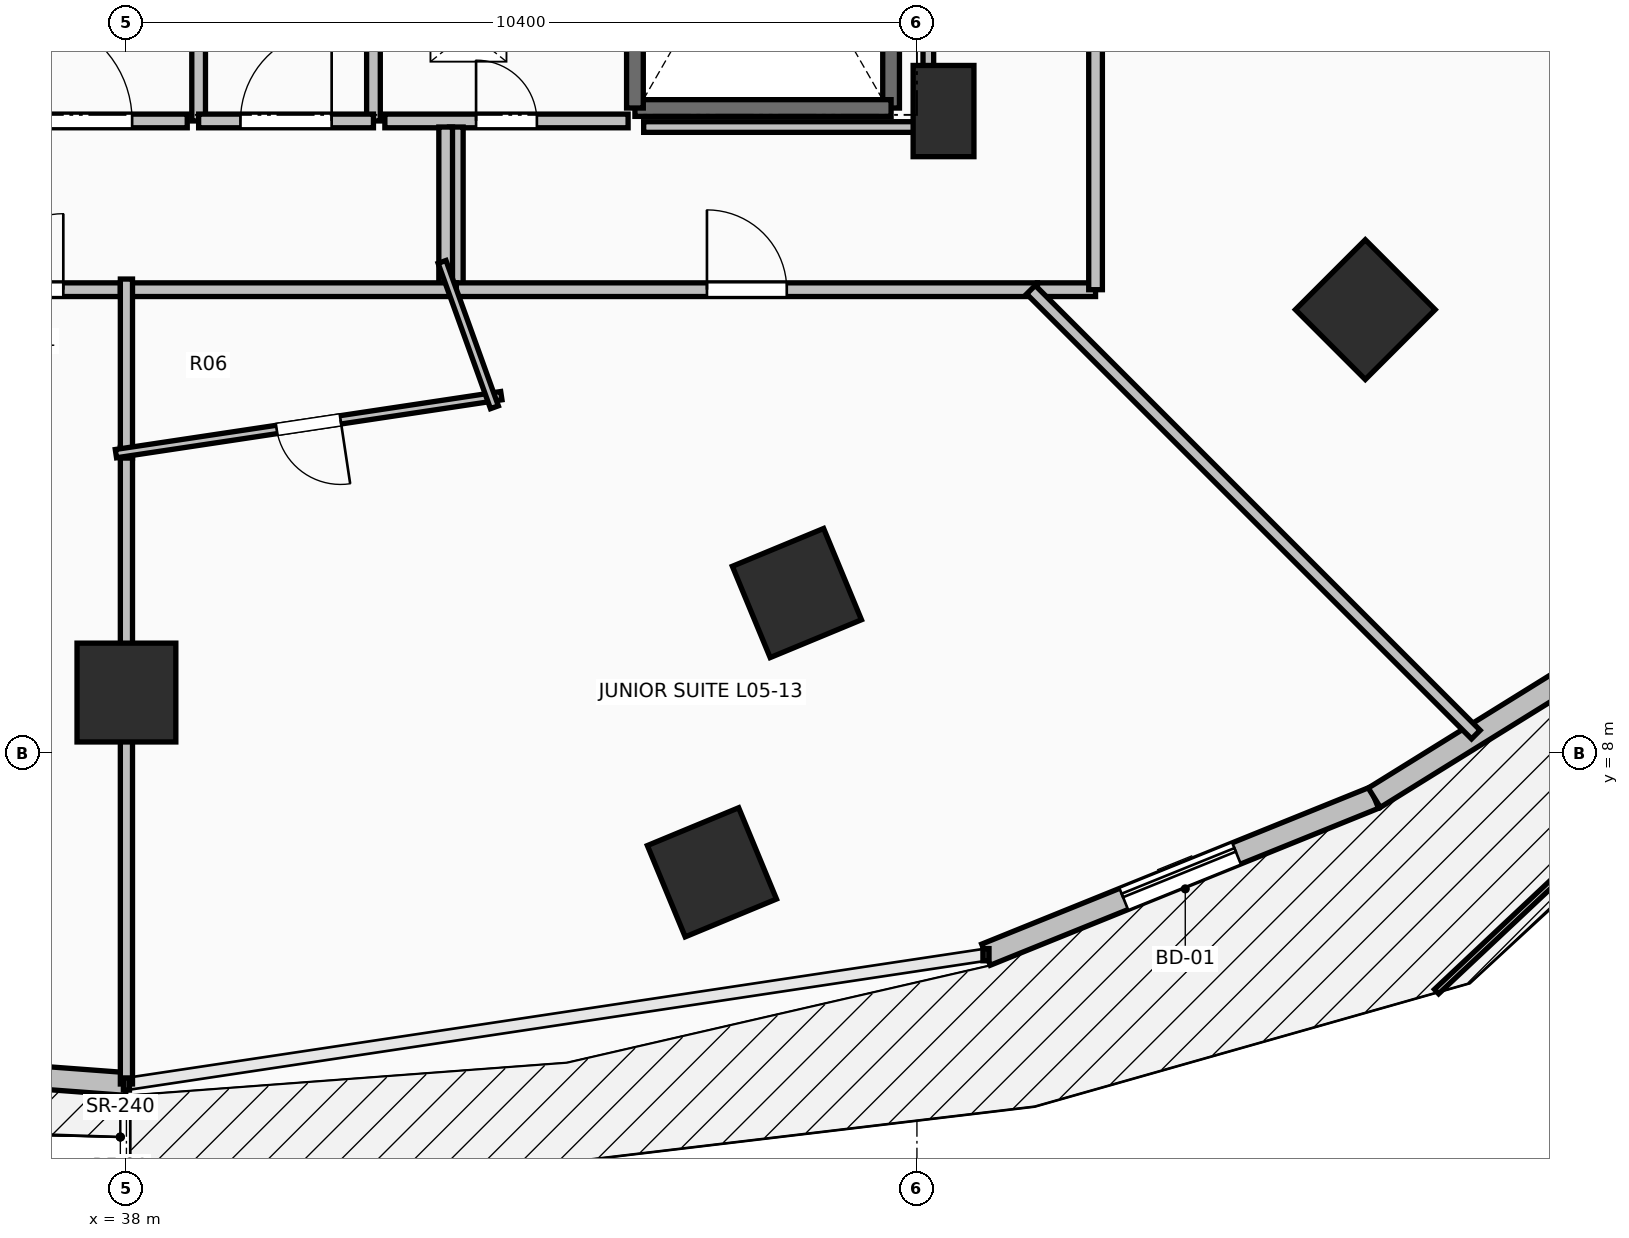
"""IFC4 building model, lengths in metres.
Left out: names, types, materials, properties, quantities, classifications, styles, units other than length and angle.
Written with IfcOpenShell. Run it as: python <this file> out.ifc"""

import sys

from ifc_helpers import new_model, si_unit, direction, frame, frame_2d, origin, origin_2d, place, context, subcontext, project, spatial, rectangle, extrude, element, fill, save


model = new_model("IFC4")
c1 = context("Model", 3, precision=1e-05, world=origin(), true_north=direction((0.0, 1.0)))
c2 = subcontext(c1, "Body", "Model", "MODEL_VIEW")
j1 = project(units=[si_unit("LENGTHUNIT", "METRE"), si_unit("PLANEANGLEUNIT", "RADIAN")], contexts=[c1])
p1 = place(None, origin())
s1 = spatial("IfcSite", under=j1, at=p1, CompositionType="ELEMENT")
p2 = place(p1, origin())
s2 = spatial("IfcBuilding", under=s1, at=p2, CompositionType="ELEMENT")
p3 = place(p2, frame((0.0, 0.0, 24.0)))
s3 = spatial("IfcBuildingStorey", under=s2, at=p3, CompositionType="ELEMENT", Elevation=24.0)
for number, where, z_axis, x_axis in (
    (1, (38.0, 8.8, 0.0), (0.0, 0.0, 1.0), (0.0, -1.0, 0.0)),
    (2, (46.821, 10.109, 0.0), (0.0, 0.0, 1.0), (0.383, -0.924, 0.0)),
    (3, (54.299, 13.838, 0.0), (0.0, 0.0, 1.0), (0.707, -0.707, 0.0)),
    (4, (45.703, 6.435, 0.0), (0.0, 0.0, 1.0), (0.383, -0.924, 0.0)),
):
    element("IfcColumn", number, at=place(p3, frame(where, z_axis=z_axis, x_axis=x_axis)), inside=s3, PredefinedType="COLUMN", context=c2, shape_type="SweptSolid", body=[
        extrude(rectangle(XDim=1.3, YDim=1.3, at=origin_2d()), origin(), (0.0, 0.0, 1.0), 3.5),
    ])
p4 = place(p3, frame((48.75, 16.45, 0.0), z_axis=(0.0, 0.0, 1.0), x_axis=(1.0, 0.0, 0.0)))
e5 = element("IfcColumn", 5, at=p4, inside=s3, PredefinedType="PILASTER", context=c2, shape_type="SweptSolid", body=[
    extrude(rectangle(XDim=0.8, YDim=1.2, at=origin_2d()), origin(), (0.0, 0.0, 1.0), 3.5),
])
p5 = place(p3, frame((32.235, 4.079, 0.0), z_axis=(0.0, 0.0, 1.0), x_axis=(0.99723690101, -0.074287032943, 0.0)))
e6 = element("IfcWall", 6, at=p5, inside=s3, PredefinedType="STANDARD", context=c2, shape_type="SweptSolid", body=[
    extrude(rectangle(XDim=5.781, YDim=0.3, at=frame_2d((2.89, 0.0))), origin(), (0.0, 0.0, 1.0), 3.24),
])
p6 = place(p5, frame((2.09, 0.0, 0.0)))
e7 = element("IfcOpeningElement", 7, at=p6, cuts=e6, PredefinedType="OPENING", context=c2, shape_type="SweptSolid", body=[
    extrude(rectangle(XDim=1.6, YDim=2.3, at=frame_2d((0.8, 1.15))), frame((0.0, 0.165, 0.0), z_axis=(0.0, -1.0, 0.0), x_axis=(1.0, 0.0, 0.0)), (0.0, 0.0, 1.0), 0.33),
])
p7 = place(p3, frame((49.308, 5.351, 0.0), z_axis=(0.0, 0.0, 1.0), x_axis=(0.927095325176, 0.374825636845, 0.0)))
e8 = element("IfcWall", 8, at=p7, inside=s3, PredefinedType="STANDARD", context=c2, shape_type="SweptSolid", body=[
    extrude(rectangle(XDim=5.51, YDim=0.3, at=frame_2d((2.755, 0.0))), origin(), (0.0, 0.0, 1.0), 3.24),
])
p8 = place(p7, frame((1.955, 0.0, 0.0)))
e9 = element("IfcOpeningElement", 9, at=p8, cuts=e8, PredefinedType="OPENING", context=c2, shape_type="SweptSolid", body=[
    extrude(rectangle(XDim=1.6, YDim=2.3, at=frame_2d((0.8, 1.15))), frame((0.0, 0.165, 0.0), z_axis=(0.0, -1.0, 0.0), x_axis=(1.0, 0.0, 0.0)), (0.0, 0.0, 1.0), 0.33),
])
p9 = place(p3, frame((54.417, 7.417, 0.0), z_axis=(0.0, 0.0, 1.0), x_axis=(0.849633724826, 0.527373239404, 0.0)))
e10 = element("IfcWall", 10, at=p9, inside=s3, PredefinedType="STANDARD", context=c2, shape_type="SweptSolid", body=[
    extrude(rectangle(XDim=5.271, YDim=0.3, at=frame_2d((2.635, 0.0))), origin(), (0.0, 0.0, 1.0), 3.24),
])
p10 = place(p3, frame((48.06, 23.91, 0.0), z_axis=(0.0, 0.0, 1.0), x_axis=(0.0, -1.0, 0.0)))
e11 = element("IfcWall", 11, at=p10, inside=s3, PredefinedType="SOLIDWALL", context=c2, shape_type="SweptSolid", body=[
    extrude(rectangle(XDim=7.42, YDim=0.22, at=frame_2d((3.71, 0.0))), origin(), (0.0, 0.0, 1.0), 3.24),
])
p11 = place(p3, frame((48.06, 16.49, 0.0), z_axis=(0.0, 0.0, 1.0), x_axis=(-1.0, 0.0, 0.0)))
e12 = element("IfcWall", 12, at=p11, inside=s3, PredefinedType="SOLIDWALL", context=c2, shape_type="SweptSolid", body=[
    extrude(rectangle(XDim=3.37, YDim=0.22, at=frame_2d((1.685, 0.0))), origin(), (0.0, 0.0, 1.0), 3.24),
])
p12 = place(p3, frame((44.69, 16.49, 0.0), z_axis=(0.0, 0.0, 1.0), x_axis=(0.0, 1.0, 0.0)))
e13 = element("IfcWall", 13, at=p12, inside=s3, PredefinedType="SOLIDWALL", context=c2, shape_type="SweptSolid", body=[
    extrude(rectangle(XDim=7.42, YDim=0.22, at=frame_2d((3.71, 0.0))), origin(), (0.0, 0.0, 1.0), 3.24),
])
p13 = place(p3, frame((41.25, 16.32, 0.0), z_axis=(0.0, 0.0, 1.0), x_axis=(0.0, 1.0, 0.0)))
e14 = element("IfcWall", 14, at=p13, inside=s3, PredefinedType="PARTITIONING", context=c2, shape_type="SweptSolid", body=[
    extrude(rectangle(XDim=3.985, YDim=0.18, at=frame_2d((1.992, 0.0))), origin(), (0.0, 0.0, 1.0), 3.24),
])
p14 = place(p13, frame((1.593, 0.0, 0.0)))
e15 = element("IfcOpeningElement", 15, at=p14, cuts=e14, PredefinedType="OPENING", context=c2, shape_type="SweptSolid", body=[
    extrude(rectangle(XDim=0.8, YDim=2.05, at=frame_2d((0.4, 1.025))), frame((0.0, 0.105, 0.0), z_axis=(0.0, -1.0, 0.0), x_axis=(1.0, 0.0, 0.0)), (0.0, 0.0, 1.0), 0.21),
])
p15 = place(p3, frame((38.95, 21.755, 0.0), z_axis=(0.0, 0.0, 1.0), x_axis=(0.0, -1.0, 0.0)))
e16 = element("IfcWall", 16, at=p15, inside=s3, PredefinedType="PARTITIONING", context=c2, shape_type="SweptSolid", body=[
    extrude(rectangle(XDim=5.435, YDim=0.18, at=frame_2d((2.717, 0.0))), origin(), (0.0, 0.0, 1.0), 3.24),
])
p16 = place(p15, frame((2.018, 0.0, 0.0)))
e17 = element("IfcOpeningElement", 17, at=p16, cuts=e16, PredefinedType="OPENING", context=c2, shape_type="SweptSolid", body=[
    extrude(rectangle(XDim=1.4, YDim=2.2, at=frame_2d((0.7, 1.1))), frame((0.0, 0.105, 0.0), z_axis=(0.0, -1.0, 0.0), x_axis=(1.0, 0.0, 0.0)), (0.0, 0.0, 1.0), 0.21),
])
p17 = place(p3, frame((38.95, 16.32, 0.0), z_axis=(0.0, 0.0, 1.0), x_axis=(1.0, 0.0, 0.0)))
e18 = element("IfcWall", 18, at=p17, inside=s3, PredefinedType="PARTITIONING", context=c2, shape_type="SweptSolid", body=[
    extrude(rectangle(XDim=2.3, YDim=0.18, at=frame_2d((1.15, 0.0))), origin(), (0.0, 0.0, 1.0), 3.24),
])
p18 = place(p17, frame((0.55, 0.0, 0.0)))
e19 = element("IfcOpeningElement", 19, at=p18, cuts=e18, PredefinedType="OPENING", context=c2, shape_type="SweptSolid", body=[
    extrude(rectangle(XDim=1.2, YDim=2.15, at=frame_2d((0.6, 1.075))), frame((0.0, 0.105, 0.0), z_axis=(0.0, -1.0, 0.0), x_axis=(1.0, 0.0, 0.0)), (0.0, 0.0, 1.0), 0.21),
])
p19 = place(p3, frame((41.4, 16.32, 0.0), z_axis=(0.0, 0.0, 1.0), x_axis=(1.0, 0.0, 0.0)))
e20 = element("IfcWall", 20, at=p19, inside=s3, PredefinedType="PARTITIONING", context=c2, shape_type="SweptSolid", body=[
    extrude(rectangle(XDim=3.2, YDim=0.18, at=frame_2d((1.6, 0.0))), origin(), (0.0, 0.0, 1.0), 3.24),
])
p20 = place(p19, frame((1.2, 0.0, 0.0)))
e21 = element("IfcOpeningElement", 21, at=p20, cuts=e20, PredefinedType="OPENING", context=c2, shape_type="SweptSolid", body=[
    extrude(rectangle(XDim=0.8, YDim=2.05, at=frame_2d((0.4, 1.025))), frame((0.0, 0.105, 0.0), z_axis=(0.0, -1.0, 0.0), x_axis=(1.0, 0.0, 0.0)), (0.0, 0.0, 1.0), 0.21),
])
p21 = place(p3, frame((35.95, 16.32, 0.0), z_axis=(0.0, 0.0, 1.0), x_axis=(1.0, 0.0, 0.0)))
e22 = element("IfcWall", 22, at=p21, inside=s3, PredefinedType="PARTITIONING", context=c2, shape_type="SweptSolid", body=[
    extrude(rectangle(XDim=2.85, YDim=0.18, at=frame_2d((1.425, 0.0))), origin(), (0.0, 0.0, 1.0), 3.24),
])
p22 = place(p21, frame((0.725, 0.0, 0.0)))
e23 = element("IfcOpeningElement", 23, at=p22, cuts=e22, PredefinedType="OPENING", context=c2, shape_type="SweptSolid", body=[
    extrude(rectangle(XDim=1.4, YDim=2.2, at=frame_2d((0.7, 1.1))), frame((0.0, 0.105, 0.0), z_axis=(0.0, -1.0, 0.0), x_axis=(1.0, 0.0, 0.0)), (0.0, 0.0, 1.0), 0.21),
])
p23 = place(p3, frame((35.279, 14.1, 0.0), z_axis=(0.0, 0.0, 1.0), x_axis=(1.0, 0.0, 0.0)))
e24 = element("IfcWall", 24, at=p23, inside=s3, PredefinedType="PARTITIONING", context=c2, shape_type="SweptSolid", body=[
    extrude(rectangle(XDim=2.781, YDim=0.18, at=frame_2d((1.391, 0.0))), origin(), (0.0, 0.0, 1.0), 3.24),
])
p24 = place(p23, frame((0.89, 0.0, 0.0)))
e25 = element("IfcOpeningElement", 25, at=p24, cuts=e24, PredefinedType="OPENING", context=c2, shape_type="SweptSolid", body=[
    extrude(rectangle(XDim=1.0, YDim=2.15, at=frame_2d((0.5, 1.075))), frame((0.0, 0.105, 0.0), z_axis=(0.0, -1.0, 0.0), x_axis=(1.0, 0.0, 0.0)), (0.0, 0.0, 1.0), 0.21),
])
p25 = place(p3, frame((42.34, 16.24, 0.0), z_axis=(0.0, 0.0, 1.0), x_axis=(0.0, -1.0, 0.0)))
e26 = element("IfcWall", 26, at=p25, inside=s3, PredefinedType="PARTITIONING", context=c2, shape_type="SweptSolid", body=[
    extrude(rectangle(XDim=2.14, YDim=0.18, at=frame_2d((1.07, 0.0))), origin(), (0.0, 0.0, 1.0), 3.24),
])
p26 = place(p3, frame((42.34, 14.1, 0.0), z_axis=(0.0, 0.0, 1.0), x_axis=(1.0, 0.0, 0.0)))
e27 = element("IfcWall", 27, at=p26, inside=s3, PredefinedType="PARTITIONING", context=c2, shape_type="SweptSolid", body=[
    extrude(rectangle(XDim=7.645, YDim=0.18, at=frame_2d((3.823, 0.0))), origin(), (0.0, 0.0, 1.0), 2.432),
])
p27 = place(p26, frame((3.298, 0.0, 0.0)))
e28 = element("IfcOpeningElement", 28, at=p27, cuts=e27, PredefinedType="OPENING", context=c2, shape_type="SweptSolid", body=[
    extrude(rectangle(XDim=1.05, YDim=2.2, at=frame_2d((0.525, 1.1))), frame((0.0, 0.105, 0.0), z_axis=(0.0, -1.0, 0.0), x_axis=(1.0, 0.0, 0.0)), (0.0, 0.0, 1.0), 0.21),
])
p28 = place(p3, frame((42.2, 14.157, 0.0), z_axis=(0.0, 0.0, 1.0), x_axis=(0.0, 1.0, 0.0)))
e29 = element("IfcWall", 29, at=p28, inside=s3, PredefinedType="PARTITIONING", context=c2, shape_type="SweptSolid", body=[
    extrude(rectangle(XDim=2.083, YDim=0.18, at=frame_2d((1.042, 0.0))), origin(), (0.0, 0.0, 1.0), 3.24),
])
p29 = place(p3, frame((37.92, 14.1, 0.0), z_axis=(0.0, 0.0, 1.0), x_axis=(1.0, 0.0, 0.0)))
e30 = element("IfcWall", 30, at=p29, inside=s3, PredefinedType="PARTITIONING", context=c2, shape_type="SweptSolid", body=[
    extrude(rectangle(XDim=4.42, YDim=0.18, at=frame_2d((2.21, 0.0))), origin(), (0.0, 0.0, 1.0), 3.24),
])
p30 = place(p3, frame((49.985, 14.1, 0.0), z_axis=(0.0, 0.0, 1.0), x_axis=(1.0, 0.0, 0.0)))
e31 = element("IfcWall", 31, at=p30, inside=s3, PredefinedType="PARTITIONING", context=c2, shape_type="SweptSolid", body=[
    extrude(rectangle(XDim=0.765, YDim=0.18, at=frame_2d((0.382, 0.0))), origin(), (0.0, 0.0, 1.0), 3.24),
])
p31 = place(p3, frame((50.75, 14.1, 0.0), z_axis=(0.0, 0.0, 1.0), x_axis=(0.0, 1.0, 0.0)))
e32 = element("IfcWall", 32, at=p31, inside=s3, PredefinedType="PARTITIONING", context=c2, shape_type="SweptSolid", body=[
    extrude(rectangle(XDim=11.7, YDim=0.18, at=frame_2d((5.85, 0.0))), origin(), (0.0, 0.0, 1.0), 2.432),
])
p32 = place(p31, frame((5.35, 0.0, 0.0)))
e33 = element("IfcOpeningElement", 33, at=p32, cuts=e32, PredefinedType="OPENING", context=c2, shape_type="SweptSolid", body=[
    extrude(rectangle(XDim=1.0, YDim=2.15, at=frame_2d((0.5, 1.075))), frame((0.0, 0.105, 0.0), z_axis=(0.0, -1.0, 0.0), x_axis=(1.0, 0.0, 0.0)), (0.0, 0.0, 1.0), 0.21),
])
p33 = place(p3, frame((38.0, 3.65, 0.0), z_axis=(0.0, 0.0, 1.0), x_axis=(0.0, 1.0, 0.0)))
e34 = element("IfcWall", 34, at=p33, inside=s3, PredefinedType="PARTITIONING", context=c2, shape_type="SweptSolid", body=[
    extrude(rectangle(XDim=8.375, YDim=0.16, at=frame_2d((4.188, 0.0))), origin(), (0.0, 0.0, 1.0), 2.432),
])
p34 = place(p3, frame((38.0, 11.885, 0.0), z_axis=(0.0, 0.0, 1.0), x_axis=(0.0, 1.0, 0.0)))
e35 = element("IfcWall", 35, at=p34, inside=s3, PredefinedType="PARTITIONING", context=c2, shape_type="SweptSolid", body=[
    extrude(rectangle(XDim=2.355, YDim=0.16, at=frame_2d((1.177, 0.0))), origin(), (0.0, 0.0, 1.0), 2.922),
])
p35 = place(p3, frame((42.932, 12.706, 0.0), z_axis=(0.0, 0.0, 1.0), x_axis=(-0.988876905643, -0.148736227888, 0.0)))
e36 = element("IfcWall", 36, at=p35, inside=s3, PredefinedType="PARTITIONING", context=c2, shape_type="SweptSolid", body=[
    extrude(rectangle(XDim=5.128, YDim=0.11, at=frame_2d((2.564, 0.0))), origin(), (0.0, 0.0, 1.0), 3.24),
])
p36 = place(p35, frame((2.139, 0.0, 0.0)))
e37 = element("IfcOpeningElement", 37, at=p36, cuts=e36, PredefinedType="OPENING", context=c2, shape_type="SweptSolid", body=[
    extrude(rectangle(XDim=0.85, YDim=2.1, at=frame_2d((0.425, 1.05))), frame((0.0, 0.07, 0.0), z_axis=(0.0, -1.0, 0.0), x_axis=(1.0, 0.0, 0.0)), (0.0, 0.0, 1.0), 0.14),
])
p37 = place(p3, frame((42.153, 14.466, 0.0), z_axis=(0.0, 0.0, 1.0), x_axis=(0.338800270412, -0.940858319179, 0.0)))
e38 = element("IfcWall", 38, at=p37, inside=s3, PredefinedType="PARTITIONING", context=c2, shape_type="SweptSolid", body=[
    extrude(rectangle(XDim=2.033, YDim=0.11, at=frame_2d((1.016, 0.0))), origin(), (0.0, 0.0, 1.0), 2.432),
])
p38 = place(p3, frame((55.753, 8.247, 0.0), z_axis=(0.0, 0.0, 1.0), x_axis=(-0.707106781187, 0.707106781187, 0.0)))
e39 = element("IfcWall", 39, at=p38, inside=s3, PredefinedType="PARTITIONING", context=c2, shape_type="SweptSolid", body=[
    extrude(rectangle(XDim=8.277, YDim=0.16, at=frame_2d((4.139, 0.0))), origin(), (0.0, 0.0, 1.0), 2.624),
])
p39 = place(p3, frame((48.55, 23.754, 0.0), z_axis=(0.0, 0.0, 1.0), x_axis=(0.0, -1.0, 0.0)))
e40 = element("IfcWall", 40, at=p39, inside=s3, PredefinedType="PARTITIONING", context=c2, shape_type="SweptSolid", body=[
    extrude(rectangle(XDim=7.514, YDim=0.14, at=frame_2d((3.757, 0.0))), origin(), (0.0, 0.0, 1.0), 2.432),
])
p40 = place(p3, frame((48.55, 16.24, 0.0), z_axis=(0.0, 0.0, 1.0), x_axis=(-1.0, 0.0, 0.0)))
e41 = element("IfcWall", 41, at=p40, inside=s3, PredefinedType="PARTITIONING", context=c2, shape_type="SweptSolid", body=[
    extrude(rectangle(XDim=3.745, YDim=0.14, at=frame_2d((1.873, 0.0))), origin(), (0.0, 0.0, 1.0), 2.432),
])
p41 = place(p8, origin())
e42 = element("IfcDoor", 42, at=p41, inside=s3, OperationType="SLIDING_TO_LEFT", PredefinedType="DOOR", context=c2, shape_type="SweptSolid", body=[
    extrude(rectangle(XDim=1.6, YDim=2.3, at=frame_2d((0.8, 1.15))), frame((0.0, 0.025, 0.0), z_axis=(0.0, -1.0, 0.0), x_axis=(1.0, 0.0, 0.0)), (0.0, 0.0, 1.0), 0.05),
])
fill(e9, e42)
p42 = place(p18, origin())
e43 = element("IfcDoor", 43, at=p42, inside=s3, OperationType="SINGLE_SWING_RIGHT", PredefinedType="DOOR", context=c2, shape_type="SweptSolid", body=[
    extrude(rectangle(XDim=1.2, YDim=2.15, at=frame_2d((0.6, 1.075))), frame((0.0, 0.025, 0.0), z_axis=(0.0, -1.0, 0.0), x_axis=(1.0, 0.0, 0.0)), (0.0, 0.0, 1.0), 0.05),
])
fill(e19, e43)
p43 = place(p20, origin())
e44 = element("IfcDoor", 44, at=p43, inside=s3, OperationType="SINGLE_SWING_LEFT", PredefinedType="DOOR", context=c2, shape_type="SweptSolid", body=[
    extrude(rectangle(XDim=0.8, YDim=2.05, at=frame_2d((0.4, 1.025))), frame((0.0, 0.025, 0.0), z_axis=(0.0, -1.0, 0.0), x_axis=(1.0, 0.0, 0.0)), (0.0, 0.0, 1.0), 0.05),
])
fill(e21, e44)
p44 = place(p22, origin())
e45 = element("IfcDoor", 45, at=p44, inside=s3, OperationType="DOUBLE_SWING_LEFT", PredefinedType="DOOR", context=c2, shape_type="SweptSolid", body=[
    extrude(rectangle(XDim=1.4, YDim=2.2, at=frame_2d((0.7, 1.1))), frame((0.0, 0.025, 0.0), z_axis=(0.0, -1.0, 0.0), x_axis=(1.0, 0.0, 0.0)), (0.0, 0.0, 1.0), 0.05),
])
fill(e23, e45)
p45 = place(p24, origin())
e46 = element("IfcDoor", 46, at=p45, inside=s3, OperationType="SINGLE_SWING_RIGHT", PredefinedType="DOOR", context=c2, shape_type="SweptSolid", body=[
    extrude(rectangle(XDim=1.0, YDim=2.15, at=frame_2d((0.5, 1.075))), frame((0.0, 0.025, 0.0), z_axis=(0.0, -1.0, 0.0), x_axis=(1.0, 0.0, 0.0)), (0.0, 0.0, 1.0), 0.05),
])
fill(e25, e46)
p46 = place(p27, origin())
e47 = element("IfcDoor", 47, at=p46, inside=s3, OperationType="SINGLE_SWING_LEFT", PredefinedType="DOOR", context=c2, shape_type="SweptSolid", body=[
    extrude(rectangle(XDim=1.05, YDim=2.2, at=frame_2d((0.525, 1.1))), frame((0.0, 0.025, 0.0), z_axis=(0.0, -1.0, 0.0), x_axis=(1.0, 0.0, 0.0)), (0.0, 0.0, 1.0), 0.05),
])
fill(e28, e47)
p47 = place(p36, origin())
e48 = element("IfcDoor", 48, at=p47, inside=s3, OperationType="SINGLE_SWING_LEFT", PredefinedType="DOOR", context=c2, shape_type="SweptSolid", body=[
    extrude(rectangle(XDim=0.85, YDim=2.1, at=frame_2d((0.425, 1.05))), frame((0.0, 0.025, 0.0), z_axis=(0.0, -1.0, 0.0), x_axis=(1.0, 0.0, 0.0)), (0.0, 0.0, 1.0), 0.05),
])
fill(e37, e48)
save(model, sys.argv[1])
